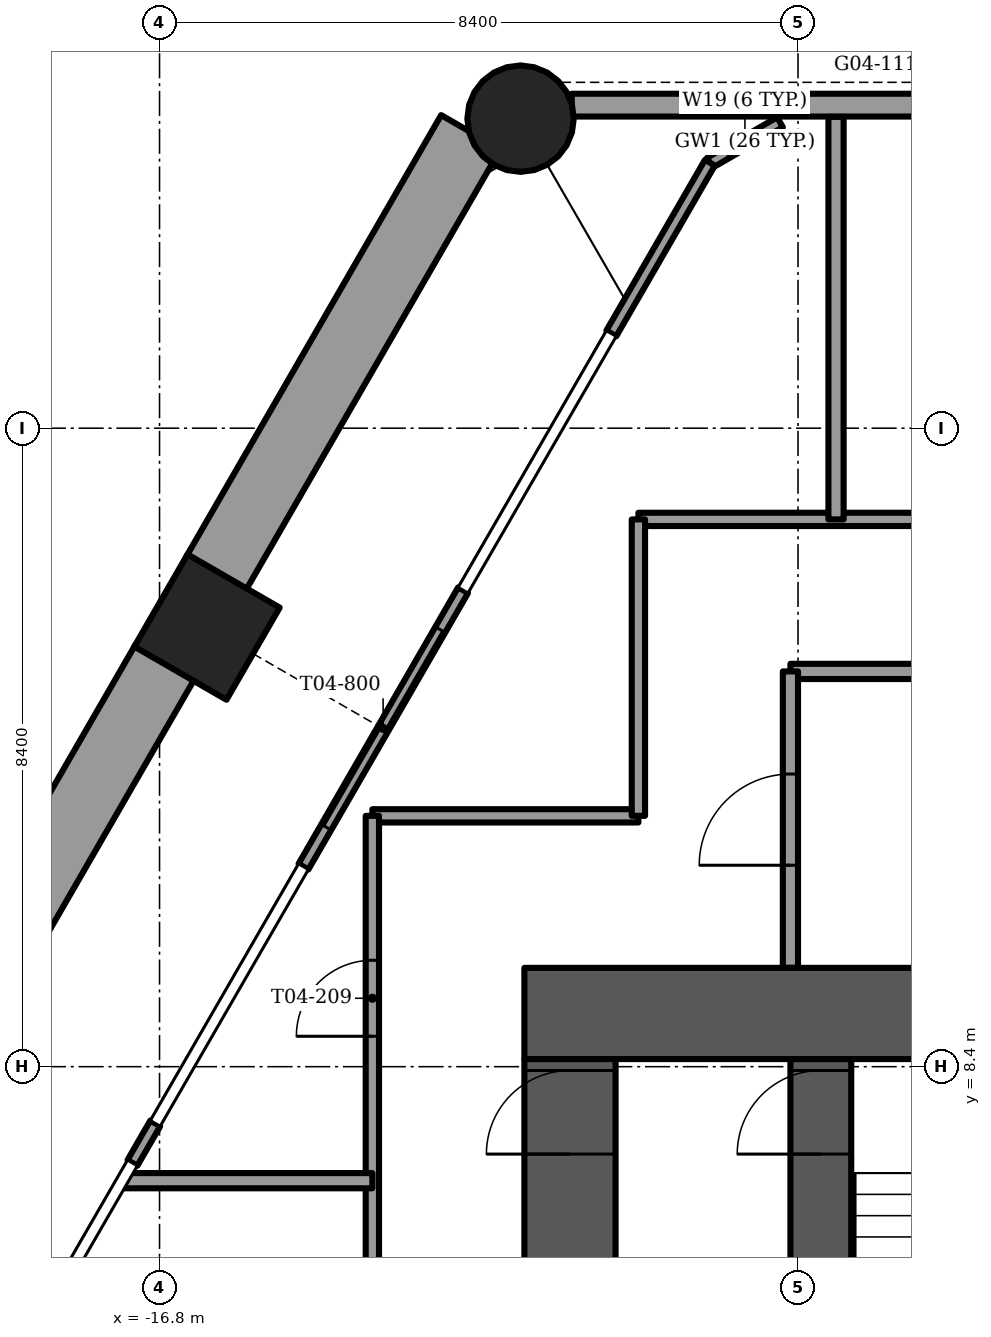
"""IFC4 building model, lengths in metres.
Left out: names, types, materials, properties, quantities, classifications, styles, units other than length and angle.
Written with IfcOpenShell. Run it as: python <this file> out.ifc"""

import sys

from ifc_helpers import new_model, si_unit, direction, frame, frame_2d, origin, origin_2d, place, context, subcontext, project, spatial, rectangle, circle, extrude, element, fill, save


model = new_model("IFC4")
c1 = context("Model", 3, precision=1e-05, world=origin(), true_north=direction((0.0, 1.0)))
c2 = subcontext(c1, "Body", "Model", "MODEL_VIEW")
j1 = project(units=[si_unit("LENGTHUNIT", "METRE"), si_unit("PLANEANGLEUNIT", "RADIAN")], contexts=[c1])
p1 = place(None, origin())
s1 = spatial("IfcSite", under=j1, at=p1, CompositionType="ELEMENT")
p2 = place(p1, origin())
s2 = spatial("IfcBuilding", under=s1, at=p2, CompositionType="ELEMENT")
p3 = place(p2, frame((0.0, 0.0, 19.0)))
s3 = spatial("IfcBuildingStorey", under=s2, at=p3, CompositionType="ELEMENT", Elevation=19.0)
p4 = place(p3, frame((-12.051, 20.872, -1.2), z_axis=(0.0, 0.0, 1.0), x_axis=(1.0, 0.0, 0.0)))
e1 = element("IfcColumn", 1, at=p4, inside=s3, PredefinedType="COLUMN", context=c2, shape_type="SweptSolid", body=[
    extrude(circle(Radius=0.7, at=origin_2d()), origin(), (0.0, 0.0, 1.0), 4.5),
])
p5 = place(p3, frame((-16.175, 14.183, -1.2), z_axis=(0.0, 0.0, 1.0), x_axis=(0.5, 0.866025403784, 0.0)))
e2 = element("IfcColumn", 2, at=p5, inside=s3, PredefinedType="COLUMN", context=c2, shape_type="SweptSolid", body=[
    extrude(rectangle(XDim=1.4, YDim=1.4, at=origin_2d()), origin(), (0.0, 0.0, 1.0), 4.5),
])
p6 = place(p3, frame((-12.0, 9.1, -0.3), z_axis=(0.0, 0.0, 1.0), x_axis=(1.0, 0.0, 0.0)))
e3 = element("IfcWall", 3, at=p6, inside=s3, PredefinedType="SHEAR", context=c2, shape_type="SweptSolid", body=[
    extrude(rectangle(XDim=24.0, YDim=1.2, at=frame_2d((12.0, 0.0))), origin(), (0.0, 0.0, 1.0), 4.5),
])
p7 = place(p6, frame((11.2, 0.0, 0.0)))
e4 = element("IfcOpeningElement", 4, at=p7, cuts=e3, PredefinedType="OPENING", context=c2, shape_type="SweptSolid", body=[
    extrude(rectangle(XDim=1.6, YDim=2.1, at=frame_2d((0.8, 1.05))), frame((0.0, 0.6, 0.0), z_axis=(0.0, -1.0, 0.0), x_axis=(1.0, 0.0, 0.0)), (0.0, 0.0, 1.0), 1.2),
])
p8 = place(p6, frame((5.25, 0.0, 0.0)))
e5 = element("IfcOpeningElement", 5, at=p8, cuts=e3, PredefinedType="OPENING", context=c2, shape_type="SweptSolid", body=[
    extrude(rectangle(XDim=1.1, YDim=2.1, at=frame_2d((0.55, 1.05))), frame((0.0, 0.6, 0.0), z_axis=(0.0, -1.0, 0.0), x_axis=(1.0, 0.0, 0.0)), (0.0, 0.0, 1.0), 1.2),
])
p9 = place(p6, frame((17.65, 0.0, 0.0)))
e6 = element("IfcOpeningElement", 6, at=p9, cuts=e3, PredefinedType="OPENING", context=c2, shape_type="SweptSolid", body=[
    extrude(rectangle(XDim=1.1, YDim=2.1, at=frame_2d((0.55, 1.05))), frame((0.0, 0.6, 0.0), z_axis=(0.0, -1.0, 0.0), x_axis=(1.0, 0.0, 0.0)), (0.0, 0.0, 1.0), 1.2),
])
p10 = place(p3, frame((-8.1, -0.5, -0.3), z_axis=(0.0, 0.0, 1.0), x_axis=(0.0, 1.0, 0.0)))
e7 = element("IfcWall", 7, at=p10, inside=s3, PredefinedType="SHEAR", context=c2, shape_type="SweptSolid", body=[
    extrude(rectangle(XDim=9.0, YDim=0.8, at=frame_2d((4.5, 0.0))), origin(), (0.0, 0.0, 1.0), 4.5),
])
p11 = place(p10, frame((7.75, 0.0, 0.0)))
e8 = element("IfcOpeningElement", 8, at=p11, cuts=e7, PredefinedType="OPENING", context=c2, shape_type="SweptSolid", body=[
    extrude(rectangle(XDim=1.1, YDim=2.1, at=frame_2d((0.55, 1.05))), frame((0.0, 0.4, 0.0), z_axis=(0.0, -1.0, 0.0), x_axis=(1.0, 0.0, 0.0)), (0.0, 0.0, 1.0), 0.8),
])
p12 = place(p3, frame((-11.4, -0.5, -0.3), z_axis=(0.0, 0.0, 1.0), x_axis=(0.0, 1.0, 0.0)))
e9 = element("IfcWall", 9, at=p12, inside=s3, PredefinedType="SHEAR", context=c2, shape_type="SweptSolid", body=[
    extrude(rectangle(XDim=9.0, YDim=1.2, at=frame_2d((4.5, 0.0))), origin(), (0.0, 0.0, 1.0), 4.5),
])
p13 = place(p12, frame((7.75, 0.0, 0.0)))
e10 = element("IfcOpeningElement", 10, at=p13, cuts=e9, PredefinedType="OPENING", context=c2, shape_type="SweptSolid", body=[
    extrude(rectangle(XDim=1.1, YDim=2.1, at=frame_2d((0.55, 1.05))), frame((0.0, 0.6, 0.0), z_axis=(0.0, -1.0, 0.0), x_axis=(1.0, 0.0, 0.0)), (0.0, 0.0, 1.0), 1.2),
])
p14 = place(p12, frame((0.55, 0.0, 0.0)))
e11 = element("IfcOpeningElement", 11, at=p14, cuts=e9, PredefinedType="OPENING", context=c2, shape_type="SweptSolid", body=[
    extrude(rectangle(XDim=1.2, YDim=2.1, at=frame_2d((0.6, 1.05))), frame((0.0, 0.6, 0.0), z_axis=(0.0, -1.0, 0.0), x_axis=(1.0, 0.0, 0.0)), (0.0, 0.0, 1.0), 1.2),
])
p15 = place(p12, frame((3.0, 0.0, 0.0)))
e12 = element("IfcOpeningElement", 12, at=p15, cuts=e9, PredefinedType="OPENING", context=c2, shape_type="SweptSolid", body=[
    extrude(rectangle(XDim=1.2, YDim=2.1, at=frame_2d((0.6, 1.05))), frame((0.0, 0.6, 0.0), z_axis=(0.0, -1.0, 0.0), x_axis=(1.0, 0.0, 0.0)), (0.0, 0.0, 1.0), 1.2),
])
p16 = place(p3, frame((-12.705, 20.694, 0.0), z_axis=(0.0, 0.0, 1.0), x_axis=(-0.500005133765, -0.866022439784, 0.0)))
e13 = element("IfcWall", 13, at=p16, inside=s3, PredefinedType="PARAPET", context=c2, shape_type="SweptSolid", body=[
    extrude(rectangle(XDim=6.704, YDim=0.9, at=frame_2d((3.352, 0.0))), origin(), (0.0, 0.0, 1.0), 1.1),
])
p17 = place(p3, frame((-16.727, 13.728, 0.0), z_axis=(0.0, 0.0, 1.0), x_axis=(-0.499997206141, -0.866027016814, 0.0)))
e14 = element("IfcWall", 14, at=p17, inside=s3, PredefinedType="PARAPET", context=c2, shape_type="SweptSolid", body=[
    extrude(rectangle(XDim=7.051, YDim=0.9, at=frame_2d((3.525, 0.0))), origin(), (0.0, 0.0, 1.0), 1.1),
])
p18 = place(p3, frame((-4.896, 21.05, 0.0), z_axis=(0.0, 0.0, 1.0), x_axis=(-1.0, 0.0, 0.0)))
e15 = element("IfcWall", 15, at=p18, inside=s3, PredefinedType="SOLIDWALL", context=c2, shape_type="SweptSolid", body=[
    extrude(rectangle(XDim=6.481, YDim=0.3, at=frame_2d((3.241, 0.0))), origin(), (0.0, 0.0, 1.0), 3.3),
])
p19 = place(p3, frame((-12.806, 14.668, 0.0), z_axis=(0.0, 0.0, 1.0), x_axis=(-0.500027713859, -0.866009402589, 0.0)))
e16 = element("IfcWall", 16, at=p19, inside=s3, PredefinedType="SOLIDWALL", context=c2, shape_type="SweptSolid", body=[
    extrude(rectangle(XDim=4.2, YDim=0.15, at=frame_2d((2.1, 0.0))), origin(), (0.0, 0.0, 1.0), 4.2),
])
p20 = place(p19, frame((0.6, 0.0, 0.0)))
e17 = element("IfcOpeningElement", 17, at=p20, cuts=e16, PredefinedType="OPENING", context=c2, shape_type="SweptSolid", body=[
    extrude(rectangle(XDim=3.0, YDim=2.4, at=frame_2d((1.5, 1.2))), frame((0.0, 0.075, 0.0), z_axis=(0.0, -1.0, 0.0), x_axis=(1.0, 0.0, 0.0)), (0.0, 0.0, 1.0), 0.15),
])
p21 = place(p3, frame((-9.56, 20.292, 0.0), z_axis=(0.0, 0.0, 1.0), x_axis=(-0.499945140294, -0.866057074734, 0.0)))
e18 = element("IfcWall", 18, at=p21, inside=s3, PredefinedType="SOLIDWALL", context=c2, shape_type="SweptSolid", body=[
    extrude(rectangle(XDim=2.594, YDim=0.15, at=frame_2d((1.297, 0.0))), origin(), (0.0, 0.0, 1.0), 4.2),
])
p22 = place(p3, frame((-16.856, 7.654, 0.0), z_axis=(0.0, 0.0, 1.0), x_axis=(-0.499945471869, -0.866056883327, 0.0)))
e19 = element("IfcWall", 19, at=p22, inside=s3, PredefinedType="SOLIDWALL", context=c2, shape_type="SweptSolid", body=[
    extrude(rectangle(XDim=0.6, YDim=0.15, at=frame_2d((0.3, 0.0))), origin(), (0.0, 0.0, 1.0), 4.2),
])
p23 = place(p3, frame((-8.637, 20.825, 0.0), z_axis=(0.0, 0.0, 1.0), x_axis=(-0.866048165231, -0.499960573946, 0.0)))
e20 = element("IfcWall", 20, at=p23, inside=s3, PredefinedType="SOLIDWALL", context=c2, shape_type="SweptSolid", body=[
    extrude(rectangle(XDim=1.065, YDim=0.15, at=frame_2d((0.532, 0.0))), origin(), (0.0, 0.0, 1.0), 4.2),
])
p24 = place(p23, frame((0.258, 0.0, 0.15)))
e21 = element("IfcOpeningElement", 21, at=p24, cuts=e20, PredefinedType="OPENING", context=c2, shape_type="SweptSolid", body=[
    extrude(rectangle(XDim=0.55, YDim=3.6, at=frame_2d((0.275, 1.8))), frame((0.0, 0.075, 0.0), z_axis=(0.0, -1.0, 0.0), x_axis=(1.0, 0.0, 0.0)), (0.0, 0.0, 1.0), 0.15),
])
p25 = place(p3, frame((-8.5, 13.6, 0.0), z_axis=(0.0, 0.0, 1.0), x_axis=(1.0, 0.0, 0.0)))
e22 = element("IfcWall", 22, at=p25, inside=s3, PredefinedType="PARTITIONING", context=c2, shape_type="SweptSolid", body=[
    extrude(rectangle(XDim=17.0, YDim=0.2, at=frame_2d((8.5, 0.0))), origin(), (0.0, 0.0, 1.0), 4.2),
])
p26 = place(p3, frame((-8.5, 9.7, 0.0), z_axis=(0.0, 0.0, 1.0), x_axis=(0.0, 1.0, 0.0)))
e23 = element("IfcWall", 23, at=p26, inside=s3, PredefinedType="PARTITIONING", context=c2, shape_type="SweptSolid", body=[
    extrude(rectangle(XDim=3.9, YDim=0.2, at=frame_2d((1.95, 0.0))), origin(), (0.0, 0.0, 1.0), 4.2),
])
p27 = place(p26, frame((1.35, 0.0, 0.0)))
e24 = element("IfcOpeningElement", 24, at=p27, cuts=e23, PredefinedType="OPENING", context=c2, shape_type="SweptSolid", body=[
    extrude(rectangle(XDim=1.2, YDim=2.1, at=frame_2d((0.6, 1.05))), frame((0.0, 0.1, 0.0), z_axis=(0.0, -1.0, 0.0), x_axis=(1.0, 0.0, 0.0)), (0.0, 0.0, 1.0), 0.2),
])
p28 = place(p3, frame((-14.0, 11.7, 0.0), z_axis=(0.0, 0.0, 1.0), x_axis=(1.0, 0.0, 0.0)))
e25 = element("IfcWall", 25, at=p28, inside=s3, PredefinedType="PARTITIONING", context=c2, shape_type="SweptSolid", body=[
    extrude(rectangle(XDim=3.5, YDim=0.175, at=frame_2d((1.75, 0.0))), origin(), (0.0, 0.0, 1.0), 4.2),
])
p29 = place(p3, frame((-10.5, 15.6, 0.0), z_axis=(0.0, 0.0, 1.0), x_axis=(1.0, 0.0, 0.0)))
e26 = element("IfcWall", 26, at=p29, inside=s3, PredefinedType="PARTITIONING", context=c2, shape_type="SweptSolid", body=[
    extrude(rectangle(XDim=21.0, YDim=0.175, at=frame_2d((10.5, 0.0))), origin(), (0.0, 0.0, 1.0), 4.2),
])
p30 = place(p29, frame((3.85, 0.0, 0.0)))
e27 = element("IfcOpeningElement", 27, at=p30, cuts=e26, PredefinedType="OPENING", context=c2, shape_type="SweptSolid", body=[
    extrude(rectangle(XDim=0.9, YDim=2.1, at=frame_2d((0.45, 1.05))), frame((0.0, 0.087, 0.0), z_axis=(0.0, -1.0, 0.0), x_axis=(1.0, 0.0, 0.0)), (0.0, 0.0, 1.0), 0.175),
])
p31 = place(p29, frame((8.0, 0.0, 0.0)))
e28 = element("IfcOpeningElement", 28, at=p31, cuts=e26, PredefinedType="OPENING", context=c2, shape_type="SweptSolid", body=[
    extrude(rectangle(XDim=0.9, YDim=2.1, at=frame_2d((0.45, 1.05))), frame((0.0, 0.087, 0.0), z_axis=(0.0, -1.0, 0.0), x_axis=(1.0, 0.0, 0.0)), (0.0, 0.0, 1.0), 0.175),
])
p32 = place(p29, frame((12.75, 0.0, 0.0)))
e29 = element("IfcOpeningElement", 29, at=p32, cuts=e26, PredefinedType="OPENING", context=c2, shape_type="SweptSolid", body=[
    extrude(rectangle(XDim=0.9, YDim=2.1, at=frame_2d((0.45, 1.05))), frame((0.0, 0.087, 0.0), z_axis=(0.0, -1.0, 0.0), x_axis=(1.0, 0.0, 0.0)), (0.0, 0.0, 1.0), 0.175),
])
p33 = place(p29, frame((17.5, 0.0, 0.0)))
e30 = element("IfcOpeningElement", 30, at=p33, cuts=e26, PredefinedType="OPENING", context=c2, shape_type="SweptSolid", body=[
    extrude(rectangle(XDim=0.9, YDim=2.1, at=frame_2d((0.45, 1.05))), frame((0.0, 0.087, 0.0), z_axis=(0.0, -1.0, 0.0), x_axis=(1.0, 0.0, 0.0)), (0.0, 0.0, 1.0), 0.175),
])
p34 = place(p3, frame((-14.0, -3.7, 0.0), z_axis=(0.0, 0.0, 1.0), x_axis=(0.0, 1.0, 0.0)))
e31 = element("IfcWall", 31, at=p34, inside=s3, PredefinedType="PARTITIONING", context=c2, shape_type="SweptSolid", body=[
    extrude(rectangle(XDim=15.4, YDim=0.175, at=frame_2d((7.7, 0.0))), origin(), (0.0, 0.0, 1.0), 4.2),
])
p35 = place(p34, frame((4.5, 0.0, 0.0)))
e32 = element("IfcOpeningElement", 32, at=p35, cuts=e31, PredefinedType="OPENING", context=c2, shape_type="SweptSolid", body=[
    extrude(rectangle(XDim=1.6, YDim=2.1, at=frame_2d((0.8, 1.05))), frame((0.0, 0.087, 0.0), z_axis=(0.0, -1.0, 0.0), x_axis=(1.0, 0.0, 0.0)), (0.0, 0.0, 1.0), 0.175),
])
p36 = place(p34, frame((12.5, 0.0, 0.0)))
e33 = element("IfcOpeningElement", 33, at=p36, cuts=e31, PredefinedType="OPENING", context=c2, shape_type="SweptSolid", body=[
    extrude(rectangle(XDim=1.0, YDim=2.1, at=frame_2d((0.5, 1.05))), frame((0.0, 0.087, 0.0), z_axis=(0.0, -1.0, 0.0), x_axis=(1.0, 0.0, 0.0)), (0.0, 0.0, 1.0), 0.175),
])
p37 = place(p3, frame((-10.5, 11.7, 0.0), z_axis=(0.0, 0.0, 1.0), x_axis=(0.0, 1.0, 0.0)))
e34 = element("IfcWall", 34, at=p37, inside=s3, PredefinedType="PARTITIONING", context=c2, shape_type="SweptSolid", body=[
    extrude(rectangle(XDim=3.9, YDim=0.175, at=frame_2d((1.95, 0.0))), origin(), (0.0, 0.0, 1.0), 4.2),
])
p38 = place(p3, frame((-17.271, 6.9, 0.0), z_axis=(0.0, 0.0, 1.0), x_axis=(1.0, 0.0, 0.0)))
e35 = element("IfcWall", 35, at=p38, inside=s3, PredefinedType="PARTITIONING", context=c2, shape_type="SweptSolid", body=[
    extrude(rectangle(XDim=3.271, YDim=0.2, at=frame_2d((1.635, 0.0))), origin(), (0.0, 0.0, 1.0), 4.2),
])
p39 = place(p3, frame((-7.9, 15.6, 0.0), z_axis=(0.0, 0.0, 1.0), x_axis=(0.0, 1.0, 0.0)))
e36 = element("IfcWall", 36, at=p39, inside=s3, PredefinedType="PARTITIONING", context=c2, shape_type="SweptSolid", body=[
    extrude(rectangle(XDim=5.295, YDim=0.2, at=frame_2d((2.647, 0.0))), origin(), (0.0, 0.0, 1.0), 4.2),
])
p40 = place(p20, origin())
e37 = element("IfcDoor", 37, at=p40, inside=s3, OperationType="SLIDING_TO_RIGHT", PredefinedType="DOOR", context=c2, shape_type="SweptSolid", body=[
    extrude(rectangle(XDim=3.0, YDim=2.4, at=frame_2d((1.5, 1.2))), frame((0.0, 0.025, 0.0), z_axis=(0.0, -1.0, 0.0), x_axis=(1.0, 0.0, 0.0)), (0.0, 0.0, 1.0), 0.05),
])
fill(e17, e37)
p41 = place(p24, origin())
e38 = element("IfcWindow", 38, at=p41, inside=s3, PartitioningType="SINGLE_PANEL", PredefinedType="WINDOW", context=c2, shape_type="SweptSolid", body=[
    extrude(rectangle(XDim=0.55, YDim=3.6, at=frame_2d((0.275, 1.8))), frame((0.0, 0.03, 0.0), z_axis=(0.0, -1.0, 0.0), x_axis=(1.0, 0.0, 0.0)), (0.0, 0.0, 1.0), 0.06),
])
fill(e21, e38)
p42 = place(p11, origin())
e39 = element("IfcDoor", 39, at=p42, inside=s3, OperationType="SINGLE_SWING_RIGHT", PredefinedType="DOOR", context=c2, shape_type="SweptSolid", body=[
    extrude(rectangle(XDim=1.1, YDim=2.1, at=frame_2d((0.55, 1.05))), frame((0.0, 0.025, 0.0), z_axis=(0.0, -1.0, 0.0), x_axis=(1.0, 0.0, 0.0)), (0.0, 0.0, 1.0), 0.05),
])
fill(e8, e39)
p43 = place(p27, origin())
e40 = element("IfcDoor", 40, at=p43, inside=s3, OperationType="SINGLE_SWING_LEFT", PredefinedType="DOOR", context=c2, shape_type="SweptSolid", body=[
    extrude(rectangle(XDim=1.2, YDim=2.1, at=frame_2d((0.6, 1.05))), frame((0.0, 0.025, 0.0), z_axis=(0.0, -1.0, 0.0), x_axis=(1.0, 0.0, 0.0)), (0.0, 0.0, 1.0), 0.05),
])
fill(e24, e40)
p44 = place(p13, origin())
e41 = element("IfcDoor", 41, at=p44, inside=s3, OperationType="SINGLE_SWING_LEFT", PredefinedType="DOOR", context=c2, shape_type="SweptSolid", body=[
    extrude(rectangle(XDim=1.1, YDim=2.1, at=frame_2d((0.55, 1.05))), frame((0.0, 0.025, 0.0), z_axis=(0.0, -1.0, 0.0), x_axis=(1.0, 0.0, 0.0)), (0.0, 0.0, 1.0), 0.05),
])
fill(e10, e41)
p45 = place(p36, origin())
e42 = element("IfcDoor", 42, at=p45, inside=s3, OperationType="SINGLE_SWING_LEFT", PredefinedType="DOOR", context=c2, shape_type="SweptSolid", body=[
    extrude(rectangle(XDim=1.0, YDim=2.1, at=frame_2d((0.5, 1.05))), frame((0.0, 0.025, 0.0), z_axis=(0.0, -1.0, 0.0), x_axis=(1.0, 0.0, 0.0)), (0.0, 0.0, 1.0), 0.05),
])
fill(e33, e42)
save(model, sys.argv[1])
